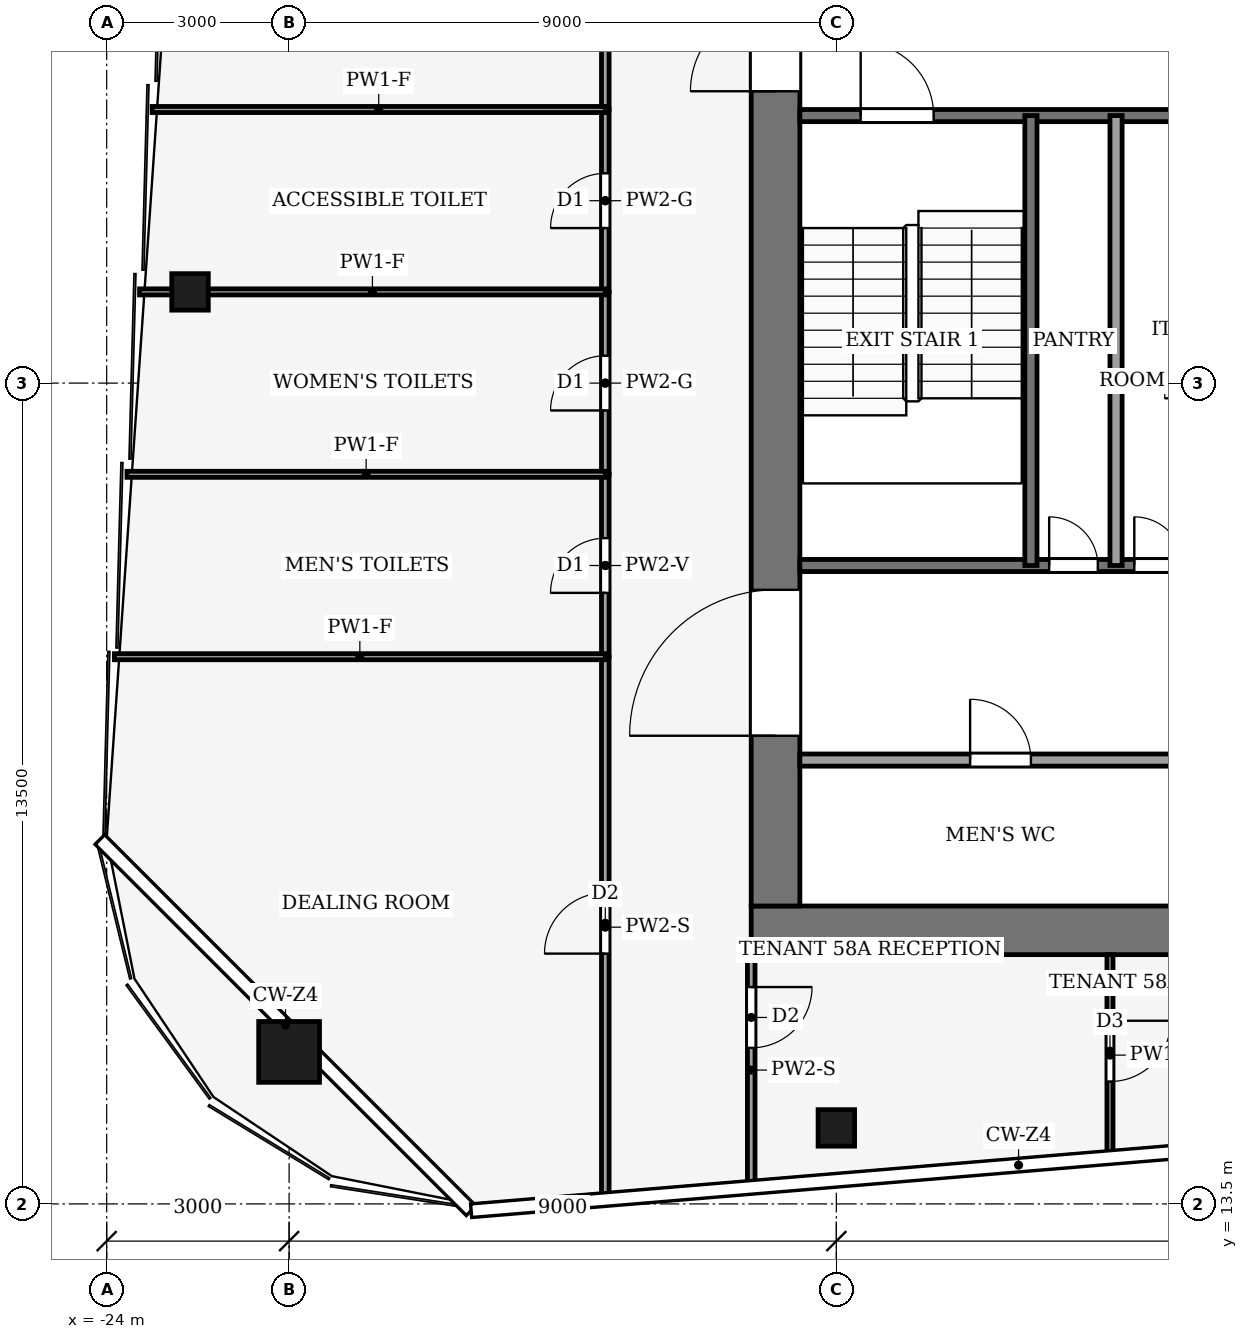
"""IFC4 building model, lengths in metres.
Left out: names, types, materials, properties, quantities, classifications, styles, units other than length and angle.
Written with IfcOpenShell. Run it as: python <this file> out.ifc"""

import sys

from ifc_helpers import new_model, si_unit, direction, frame, frame_2d, origin, origin_2d, place, context, subcontext, project, spatial, rectangle, hollow_rectangle, extrude, element, fill, save


model = new_model("IFC4")
c1 = context("Model", 3, precision=1e-05, world=origin(), true_north=direction((0.0, 1.0)))
c2 = subcontext(c1, "Body", "Model", "MODEL_VIEW")
j1 = project(units=[si_unit("LENGTHUNIT", "METRE"), si_unit("PLANEANGLEUNIT", "RADIAN")], contexts=[c1])
p1 = place(None, origin())
s1 = spatial("IfcSite", under=j1, at=p1, CompositionType="ELEMENT")
p2 = place(p1, origin())
s2 = spatial("IfcBuilding", under=s1, at=p2, CompositionType="ELEMENT")
p3 = place(p2, frame((0.0, 0.0, 254.0)))
s3 = spatial("IfcBuildingStorey", under=s2, at=p3, CompositionType="ELEMENT", Elevation=254.0)
p4 = place(p3, frame((-13.4, 18.0, -0.13), z_axis=(0.0, 0.0, 1.0), x_axis=(1.0, 0.0, 0.0)))
e1 = element("IfcWall", 1, at=p4, inside=s3, PredefinedType="SHEAR", context=c2, shape_type="SweptSolid", body=[
    extrude(rectangle(XDim=26.8, YDim=0.8, at=frame_2d((13.4, 0.0))), origin(), (0.0, 0.0, 1.0), 4.0),
])
p5 = place(p3, frame((-13.0, 18.4, -0.13), z_axis=(0.0, 0.0, 1.0), x_axis=(0.0, 1.0, 0.0)))
e2 = element("IfcWall", 2, at=p5, inside=s3, PredefinedType="SHEAR", context=c2, shape_type="SweptSolid", body=[
    extrude(rectangle(XDim=19.2, YDim=0.8, at=frame_2d((9.6, 0.0))), origin(), (0.0, 0.0, 1.0), 4.0),
])
p6 = place(p5, frame((2.8, 0.0, 0.13)))
e3 = element("IfcOpeningElement", 3, at=p6, cuts=e2, PredefinedType="OPENING", context=c2, shape_type="SweptSolid", body=[
    extrude(rectangle(XDim=2.4, YDim=2.4, at=frame_2d((1.2, 1.2))), frame((0.0, 0.41, 0.0), z_axis=(0.0, -1.0, 0.0), x_axis=(1.0, 0.0, 0.0)), (0.0, 0.0, 1.0), 0.82),
])
p7 = place(p5, frame((13.4, 0.0, 0.13)))
e4 = element("IfcOpeningElement", 4, at=p7, cuts=e2, PredefinedType="OPENING", context=c2, shape_type="SweptSolid", body=[
    extrude(rectangle(XDim=1.4, YDim=2.2, at=frame_2d((0.7, 1.1))), frame((0.0, 0.41, 0.0), z_axis=(0.0, -1.0, 0.0), x_axis=(1.0, 0.0, 0.0)), (0.0, 0.0, 1.0), 0.82),
])
p8 = place(p3, frame((-21.0, 16.0, 0.0), z_axis=(0.0, 0.0, 1.0), x_axis=(1.0, 0.0, 0.0)))
e5 = element("IfcColumn", 5, at=p8, inside=s3, PredefinedType="COLUMN", context=c2, shape_type="SweptSolid", body=[
    extrude(hollow_rectangle(XDim=1.0, YDim=1.0, WallThickness=0.045, at=origin_2d()), origin(), (0.0, 0.0, 1.0), 4.0),
])
for number, where, z_axis, x_axis in (
    (6, (-12.0, 14.75, 0.0), (0.0, 0.0, 1.0), (1.0, 0.0, 0.0)),
    (7, (-22.629, 28.5, 0.0), (0.0, 0.0, 1.0), (1.0, 0.0, 0.0)),
):
    element("IfcColumn", number, at=place(p3, frame(where, z_axis=z_axis, x_axis=x_axis)), inside=s3, PredefinedType="COLUMN", context=c2, shape_type="SweptSolid", body=[
        extrude(hollow_rectangle(XDim=0.6, YDim=0.6, WallThickness=0.025, at=origin_2d()), origin(), (0.0, 0.0, 1.0), 4.0),
    ])
p9 = place(p3, frame((-12.6, 20.8, 0.0), z_axis=(0.0, 0.0, 1.0), x_axis=(1.0, 0.0, 0.0)))
e8 = element("IfcWall", 8, at=p9, inside=s3, PredefinedType="PARTITIONING", context=c2, shape_type="SweptSolid", body=[
    extrude(rectangle(XDim=6.6, YDim=0.2, at=frame_2d((3.3, 0.0))), origin(), (0.0, 0.0, 1.0), 3.87),
])
p10 = place(p9, frame((2.8, 0.0, 0.0)))
e9 = element("IfcOpeningElement", 9, at=p10, cuts=e8, PredefinedType="OPENING", context=c2, shape_type="SweptSolid", body=[
    extrude(rectangle(XDim=1.0, YDim=2.1, at=frame_2d((0.5, 1.05))), frame((0.0, 0.11, 0.0), z_axis=(0.0, -1.0, 0.0), x_axis=(1.0, 0.0, 0.0)), (0.0, 0.0, 1.0), 0.22),
])
p11 = place(p3, frame((-12.6, 24.0, 0.0), z_axis=(0.0, 0.0, 1.0), x_axis=(1.0, 0.0, 0.0)))
e10 = element("IfcWall", 10, at=p11, inside=s3, PredefinedType="PARTITIONING", context=c2, shape_type="SweptSolid", body=[
    extrude(rectangle(XDim=6.6, YDim=0.2, at=frame_2d((3.3, 0.0))), origin(), (0.0, 0.0, 1.0), 3.87),
])
p12 = place(p11, frame((4.1, 0.0, 0.0)))
e11 = element("IfcOpeningElement", 11, at=p12, cuts=e10, PredefinedType="OPENING", context=c2, shape_type="SweptSolid", body=[
    extrude(rectangle(XDim=0.8, YDim=2.1, at=frame_2d((0.4, 1.05))), frame((0.0, 0.11, 0.0), z_axis=(0.0, -1.0, 0.0), x_axis=(1.0, 0.0, 0.0)), (0.0, 0.0, 1.0), 0.22),
])
p13 = place(p11, frame((5.5, 0.0, 0.0)))
e12 = element("IfcOpeningElement", 12, at=p13, cuts=e10, PredefinedType="OPENING", context=c2, shape_type="SweptSolid", body=[
    extrude(rectangle(XDim=0.8, YDim=2.1, at=frame_2d((0.4, 1.05))), frame((0.0, 0.11, 0.0), z_axis=(0.0, -1.0, 0.0), x_axis=(1.0, 0.0, 0.0)), (0.0, 0.0, 1.0), 0.22),
])
p14 = place(p3, frame((-12.6, 31.4, 0.0), z_axis=(0.0, 0.0, 1.0), x_axis=(1.0, 0.0, 0.0)))
e13 = element("IfcWall", 13, at=p14, inside=s3, PredefinedType="PARTITIONING", context=c2, shape_type="SweptSolid", body=[
    extrude(rectangle(XDim=6.6, YDim=0.2, at=frame_2d((3.3, 0.0))), origin(), (0.0, 0.0, 1.0), 3.87),
])
p15 = place(p14, frame((1.0, 0.0, 0.0)))
e14 = element("IfcOpeningElement", 14, at=p15, cuts=e13, PredefinedType="OPENING", context=c2, shape_type="SweptSolid", body=[
    extrude(rectangle(XDim=1.2, YDim=2.2, at=frame_2d((0.6, 1.1))), frame((0.0, 0.11, 0.0), z_axis=(0.0, -1.0, 0.0), x_axis=(1.0, 0.0, 0.0)), (0.0, 0.0, 1.0), 0.22),
])
for number, where, z_axis, x_axis in (
    (15, (-8.8, 24.0, 0.0), (0.0, 0.0, 1.0), (0.0, 1.0, 0.0)),
    (16, (-7.4, 24.0, 0.0), (0.0, 0.0, 1.0), (0.0, 1.0, 0.0)),
):
    element("IfcWall", number, at=place(p3, frame(where, z_axis=z_axis, x_axis=x_axis)), inside=s3, PredefinedType="PARTITIONING", context=c2, shape_type="SweptSolid", body=[
        extrude(rectangle(XDim=7.4, YDim=0.2, at=frame_2d((3.7, 0.0))), origin(), (0.0, 0.0, 1.0), 3.87),
    ])
p16 = place(p3, frame((-15.8, 13.603, 0.0), z_axis=(0.0, 0.0, 1.0), x_axis=(0.0, 1.0, 0.0)))
e17 = element("IfcWall", 17, at=p16, inside=s3, PredefinedType="PARTITIONING", context=c2, shape_type="SweptSolid", body=[
    extrude(rectangle(XDim=8.897, YDim=0.125, at=frame_2d((4.448, 0.0))), origin(), (0.0, 0.0, 1.0), 3.04),
])
p17 = place(p16, frame((4.013, 0.0, 0.0)))
e18 = element("IfcOpeningElement", 18, at=p17, cuts=e17, PredefinedType="OPENING", context=c2, shape_type="SweptSolid", body=[
    extrude(rectangle(XDim=1.0, YDim=2.1, at=frame_2d((0.5, 1.05))), frame((0.0, 0.073, 0.0), z_axis=(0.0, -1.0, 0.0), x_axis=(1.0, 0.0, 0.0)), (0.0, 0.0, 1.0), 0.145),
])
p18 = place(p3, frame((-15.8, 22.5, 0.0), z_axis=(0.0, 0.0, 1.0), x_axis=(0.0, 1.0, 0.0)))
e19 = element("IfcWall", 19, at=p18, inside=s3, PredefinedType="PARTITIONING", context=c2, shape_type="SweptSolid", body=[
    extrude(rectangle(XDim=3.0, YDim=0.125, at=frame_2d((1.5, 0.0))), origin(), (0.0, 0.0, 1.0), 3.44),
])
p19 = place(p18, frame((1.05, 0.0, 0.0)))
e20 = element("IfcOpeningElement", 20, at=p19, cuts=e19, PredefinedType="OPENING", context=c2, shape_type="SweptSolid", body=[
    extrude(rectangle(XDim=0.9, YDim=2.1, at=frame_2d((0.45, 1.05))), frame((0.0, 0.073, 0.0), z_axis=(0.0, -1.0, 0.0), x_axis=(1.0, 0.0, 0.0)), (0.0, 0.0, 1.0), 0.145),
])
p20 = place(p3, frame((-15.8, 25.5, 0.0), z_axis=(0.0, 0.0, 1.0), x_axis=(0.0, 1.0, 0.0)))
e21 = element("IfcWall", 21, at=p20, inside=s3, PredefinedType="PARTITIONING", context=c2, shape_type="SweptSolid", body=[
    extrude(rectangle(XDim=3.0, YDim=0.125, at=frame_2d((1.5, 0.0))), origin(), (0.0, 0.0, 1.0), 3.87),
])
p21 = place(p20, frame((1.05, 0.0, 0.0)))
e22 = element("IfcOpeningElement", 22, at=p21, cuts=e21, PredefinedType="OPENING", context=c2, shape_type="SweptSolid", body=[
    extrude(rectangle(XDim=0.9, YDim=2.1, at=frame_2d((0.45, 1.05))), frame((0.0, 0.073, 0.0), z_axis=(0.0, -1.0, 0.0), x_axis=(1.0, 0.0, 0.0)), (0.0, 0.0, 1.0), 0.145),
])
p22 = place(p3, frame((-15.8, 28.5, 0.0), z_axis=(0.0, 0.0, 1.0), x_axis=(0.0, 1.0, 0.0)))
e23 = element("IfcWall", 23, at=p22, inside=s3, PredefinedType="PARTITIONING", context=c2, shape_type="SweptSolid", body=[
    extrude(rectangle(XDim=3.0, YDim=0.125, at=frame_2d((1.5, 0.0))), origin(), (0.0, 0.0, 1.0), 3.87),
])
p23 = place(p22, frame((1.05, 0.0, 0.0)))
e24 = element("IfcOpeningElement", 24, at=p23, cuts=e23, PredefinedType="OPENING", context=c2, shape_type="SweptSolid", body=[
    extrude(rectangle(XDim=0.9, YDim=2.1, at=frame_2d((0.45, 1.05))), frame((0.0, 0.073, 0.0), z_axis=(0.0, -1.0, 0.0), x_axis=(1.0, 0.0, 0.0)), (0.0, 0.0, 1.0), 0.145),
])
p24 = place(p3, frame((-15.8, 31.5, 0.0), z_axis=(0.0, 0.0, 1.0), x_axis=(0.0, 1.0, 0.0)))
e25 = element("IfcWall", 25, at=p24, inside=s3, PredefinedType="PARTITIONING", context=c2, shape_type="SweptSolid", body=[
    extrude(rectangle(XDim=12.0, YDim=0.125, at=frame_2d((6.0, 0.0))), origin(), (0.0, 0.0, 1.0), 3.14),
])
p25 = place(p24, frame((5.5, 0.0, 0.0)))
e26 = element("IfcOpeningElement", 26, at=p25, cuts=e25, PredefinedType="OPENING", context=c2, shape_type="SweptSolid", body=[
    extrude(rectangle(XDim=1.0, YDim=2.1, at=frame_2d((0.5, 1.05))), frame((0.0, 0.073, 0.0), z_axis=(0.0, -1.0, 0.0), x_axis=(1.0, 0.0, 0.0)), (0.0, 0.0, 1.0), 0.145),
])
p26 = place(p3, frame((-13.4, 17.6, 0.0), z_axis=(0.0, 0.0, 1.0), x_axis=(0.0, -1.0, 0.0)))
e27 = element("IfcWall", 27, at=p26, inside=s3, PredefinedType="PARTITIONING", context=c2, shape_type="SweptSolid", body=[
    extrude(rectangle(XDim=3.797, YDim=0.125, at=frame_2d((1.898, 0.0))), origin(), (0.0, 0.0, 1.0), 3.04),
])
p27 = place(p26, frame((0.533, 0.0, 0.0)))
e28 = element("IfcOpeningElement", 28, at=p27, cuts=e27, PredefinedType="OPENING", context=c2, shape_type="SweptSolid", body=[
    extrude(rectangle(XDim=1.0, YDim=2.1, at=frame_2d((0.5, 1.05))), frame((0.0, 0.073, 0.0), z_axis=(0.0, -1.0, 0.0), x_axis=(1.0, 0.0, 0.0)), (0.0, 0.0, 1.0), 0.145),
])
p28 = place(p3, frame((-15.8, 22.5, 0.0), z_axis=(0.0, 0.0, 1.0), x_axis=(-1.0, 0.0, 0.0)))
e29 = element("IfcWall", 29, at=p28, inside=s3, PredefinedType="PARTITIONING", context=c2, shape_type="SweptSolid", body=[
    extrude(rectangle(XDim=8.073, YDim=0.1, at=frame_2d((4.037, 0.0))), origin(), (0.0, 0.0, 1.0), 3.04),
])
p29 = place(p3, frame((-15.8, 25.5, 0.0), z_axis=(0.0, 0.0, 1.0), x_axis=(-1.0, 0.0, 0.0)))
e30 = element("IfcWall", 30, at=p29, inside=s3, PredefinedType="PARTITIONING", context=c2, shape_type="SweptSolid", body=[
    extrude(rectangle(XDim=7.866, YDim=0.1, at=frame_2d((3.933, 0.0))), origin(), (0.0, 0.0, 1.0), 3.04),
])
p30 = place(p3, frame((-15.8, 28.5, 0.0), z_axis=(0.0, 0.0, 1.0), x_axis=(-1.0, 0.0, 0.0)))
e31 = element("IfcWall", 31, at=p30, inside=s3, PredefinedType="PARTITIONING", context=c2, shape_type="SweptSolid", body=[
    extrude(rectangle(XDim=7.659, YDim=0.1, at=frame_2d((3.83, 0.0))), origin(), (0.0, 0.0, 1.0), 3.04),
])
p31 = place(p3, frame((-15.8, 31.5, 0.0), z_axis=(0.0, 0.0, 1.0), x_axis=(-1.0, 0.0, 0.0)))
e32 = element("IfcWall", 32, at=p31, inside=s3, PredefinedType="PARTITIONING", context=c2, shape_type="SweptSolid", body=[
    extrude(rectangle(XDim=7.452, YDim=0.1, at=frame_2d((3.726, 0.0))), origin(), (0.0, 0.0, 1.0), 3.04),
])
p32 = place(p3, frame((-7.5, 17.6, 0.0), z_axis=(0.0, 0.0, 1.0), x_axis=(0.0, -1.0, 0.0)))
e33 = element("IfcWall", 33, at=p32, inside=s3, PredefinedType="PARTITIONING", context=c2, shape_type="SweptSolid", body=[
    extrude(rectangle(XDim=3.305, YDim=0.1, at=frame_2d((1.653, 0.0))), origin(), (0.0, 0.0, 1.0), 3.04),
])
p33 = place(p32, frame((1.087, 0.0, 0.0)))
e34 = element("IfcOpeningElement", 34, at=p33, cuts=e33, PredefinedType="OPENING", context=c2, shape_type="SweptSolid", body=[
    extrude(rectangle(XDim=1.0, YDim=2.1, at=frame_2d((0.5, 1.05))), frame((0.0, 0.06, 0.0), z_axis=(0.0, -1.0, 0.0), x_axis=(1.0, 0.0, 0.0)), (0.0, 0.0, 1.0), 0.12),
])
p34 = place(p10, origin())
e35 = element("IfcDoor", 35, at=p34, inside=s3, OperationType="SINGLE_SWING_LEFT", PredefinedType="DOOR", context=c2, shape_type="SweptSolid", body=[
    extrude(rectangle(XDim=1.0, YDim=2.1, at=frame_2d((0.5, 1.05))), frame((0.0, 0.025, 0.0), z_axis=(0.0, -1.0, 0.0), x_axis=(1.0, 0.0, 0.0)), (0.0, 0.0, 1.0), 0.05),
])
fill(e9, e35)
p35 = place(p12, origin())
e36 = element("IfcDoor", 36, at=p35, inside=s3, OperationType="SINGLE_SWING_LEFT", PredefinedType="DOOR", context=c2, shape_type="SweptSolid", body=[
    extrude(rectangle(XDim=0.8, YDim=2.1, at=frame_2d((0.4, 1.05))), frame((0.0, 0.025, 0.0), z_axis=(0.0, -1.0, 0.0), x_axis=(1.0, 0.0, 0.0)), (0.0, 0.0, 1.0), 0.05),
])
fill(e11, e36)
p36 = place(p13, origin())
e37 = element("IfcDoor", 37, at=p36, inside=s3, OperationType="SINGLE_SWING_RIGHT", PredefinedType="DOOR", context=c2, shape_type="SweptSolid", body=[
    extrude(rectangle(XDim=0.8, YDim=2.1, at=frame_2d((0.4, 1.05))), frame((0.0, 0.025, 0.0), z_axis=(0.0, -1.0, 0.0), x_axis=(1.0, 0.0, 0.0)), (0.0, 0.0, 1.0), 0.05),
])
fill(e12, e37)
p37 = place(p15, origin())
e38 = element("IfcDoor", 38, at=p37, inside=s3, OperationType="SINGLE_SWING_RIGHT", PredefinedType="DOOR", context=c2, shape_type="SweptSolid", body=[
    extrude(rectangle(XDim=1.2, YDim=2.2, at=frame_2d((0.6, 1.1))), frame((0.0, 0.025, 0.0), z_axis=(0.0, -1.0, 0.0), x_axis=(1.0, 0.0, 0.0)), (0.0, 0.0, 1.0), 0.05),
])
fill(e14, e38)
p38 = place(p6, origin())
e39 = element("IfcDoor", 39, at=p38, inside=s3, OperationType="DOUBLE_DOOR_SINGLE_SWING", PredefinedType="DOOR", context=c2, shape_type="SweptSolid", body=[
    extrude(rectangle(XDim=2.4, YDim=2.4, at=frame_2d((1.2, 1.2))), frame((0.0, 0.025, 0.0), z_axis=(0.0, -1.0, 0.0), x_axis=(1.0, 0.0, 0.0)), (0.0, 0.0, 1.0), 0.05),
])
fill(e3, e39)
p39 = place(p7, origin())
e40 = element("IfcDoor", 40, at=p39, inside=s3, OperationType="SINGLE_SWING_RIGHT", PredefinedType="DOOR", context=c2, shape_type="SweptSolid", body=[
    extrude(rectangle(XDim=1.4, YDim=2.2, at=frame_2d((0.7, 1.1))), frame((0.0, 0.025, 0.0), z_axis=(0.0, -1.0, 0.0), x_axis=(1.0, 0.0, 0.0)), (0.0, 0.0, 1.0), 0.05),
])
fill(e4, e40)
p40 = place(p17, origin())
e41 = element("IfcDoor", 41, at=p40, inside=s3, OperationType="SINGLE_SWING_RIGHT", PredefinedType="DOOR", context=c2, shape_type="SweptSolid", body=[
    extrude(rectangle(XDim=1.0, YDim=2.1, at=frame_2d((0.5, 1.05))), frame((0.0, 0.025, 0.0), z_axis=(0.0, -1.0, 0.0), x_axis=(1.0, 0.0, 0.0)), (0.0, 0.0, 1.0), 0.05),
])
fill(e18, e41)
p41 = place(p19, origin())
e42 = element("IfcDoor", 42, at=p41, inside=s3, OperationType="SINGLE_SWING_RIGHT", PredefinedType="DOOR", context=c2, shape_type="SweptSolid", body=[
    extrude(rectangle(XDim=0.9, YDim=2.1, at=frame_2d((0.45, 1.05))), frame((0.0, 0.025, 0.0), z_axis=(0.0, -1.0, 0.0), x_axis=(1.0, 0.0, 0.0)), (0.0, 0.0, 1.0), 0.05),
])
fill(e20, e42)
p42 = place(p21, origin())
e43 = element("IfcDoor", 43, at=p42, inside=s3, OperationType="SINGLE_SWING_LEFT", PredefinedType="DOOR", context=c2, shape_type="SweptSolid", body=[
    extrude(rectangle(XDim=0.9, YDim=2.1, at=frame_2d((0.45, 1.05))), frame((0.0, 0.025, 0.0), z_axis=(0.0, -1.0, 0.0), x_axis=(1.0, 0.0, 0.0)), (0.0, 0.0, 1.0), 0.05),
])
fill(e22, e43)
p43 = place(p23, origin())
e44 = element("IfcDoor", 44, at=p43, inside=s3, OperationType="SINGLE_SWING_RIGHT", PredefinedType="DOOR", context=c2, shape_type="SweptSolid", body=[
    extrude(rectangle(XDim=0.9, YDim=2.1, at=frame_2d((0.45, 1.05))), frame((0.0, 0.025, 0.0), z_axis=(0.0, -1.0, 0.0), x_axis=(1.0, 0.0, 0.0)), (0.0, 0.0, 1.0), 0.05),
])
fill(e24, e44)
p44 = place(p27, origin())
e45 = element("IfcDoor", 45, at=p44, inside=s3, OperationType="SINGLE_SWING_LEFT", PredefinedType="DOOR", context=c2, shape_type="SweptSolid", body=[
    extrude(rectangle(XDim=1.0, YDim=2.1, at=frame_2d((0.5, 1.05))), frame((0.0, 0.025, 0.0), z_axis=(0.0, -1.0, 0.0), x_axis=(1.0, 0.0, 0.0)), (0.0, 0.0, 1.0), 0.05),
])
fill(e28, e45)
p45 = place(p33, origin())
e46 = element("IfcDoor", 46, at=p45, inside=s3, OperationType="SINGLE_SWING_LEFT", PredefinedType="DOOR", context=c2, shape_type="SweptSolid", body=[
    extrude(rectangle(XDim=1.0, YDim=2.1, at=frame_2d((0.5, 1.05))), frame((0.0, 0.025, 0.0), z_axis=(0.0, -1.0, 0.0), x_axis=(1.0, 0.0, 0.0)), (0.0, 0.0, 1.0), 0.05),
])
fill(e34, e46)
save(model, sys.argv[1])
